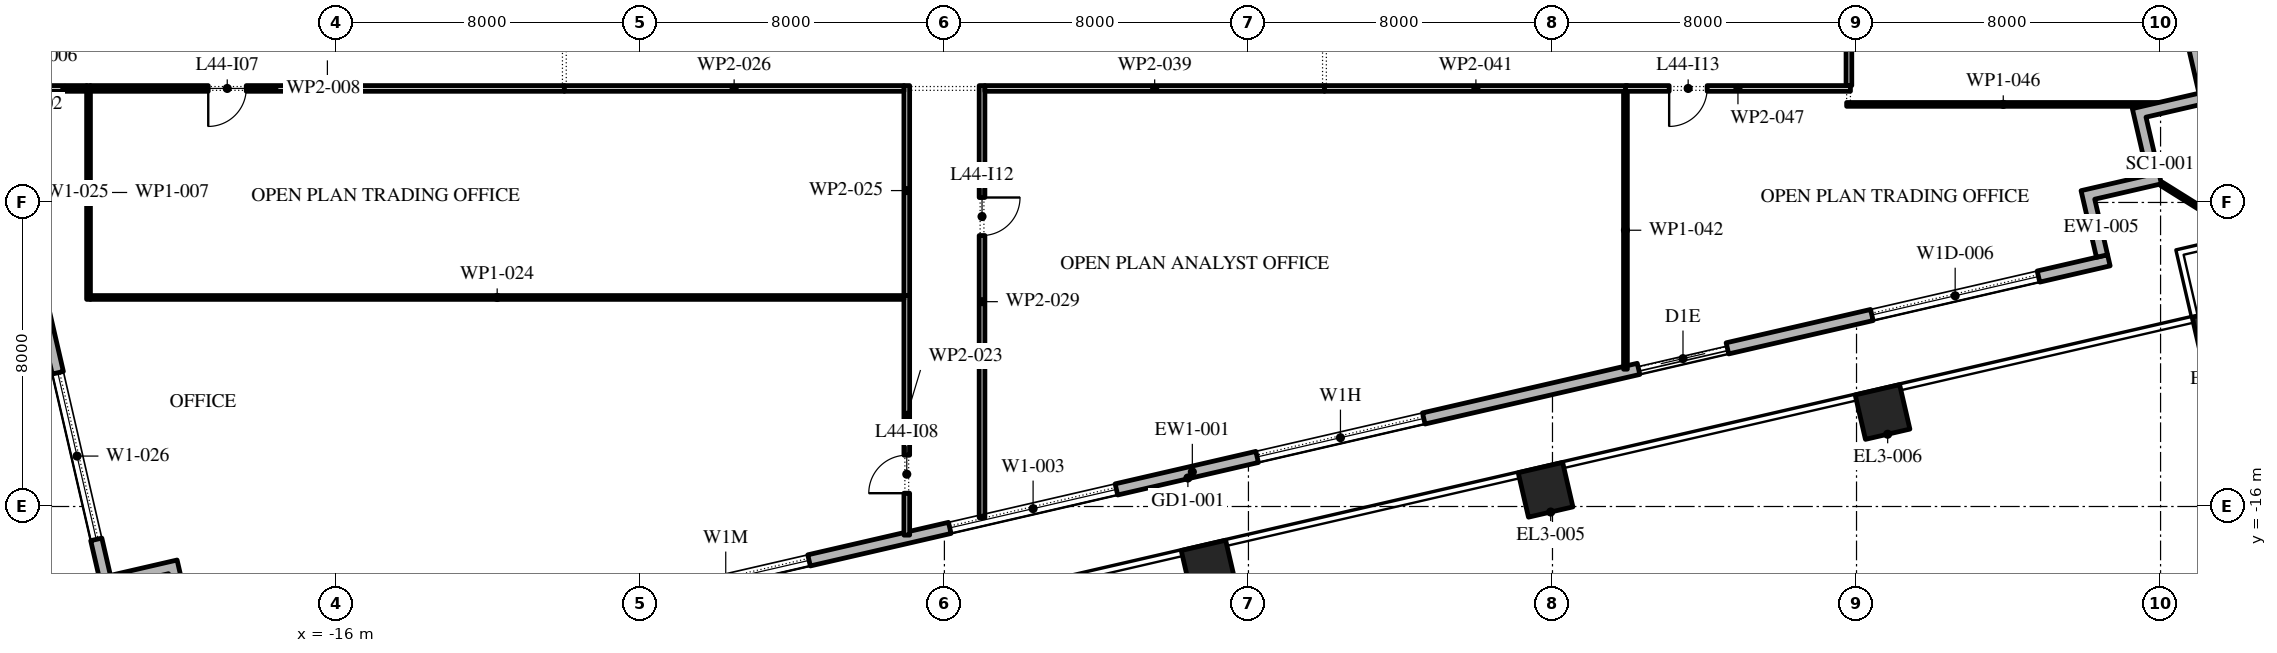
"""IFC4 building model, lengths in metres.
Left out: names, types, materials, properties, quantities, classifications, styles, units other than length and angle.
Written with IfcOpenShell. Run it as: python <this file> out.ifc"""

import sys

from ifc_helpers import new_model, si_unit, direction, frame, frame_2d, origin, origin_2d, place, context, subcontext, project, spatial, polyline, rectangle, outline, extrude, element, fill, save


model = new_model("IFC4")
c1 = context("Model", 3, precision=1e-05, world=origin(), true_north=direction((0.0, 1.0)))
c2 = subcontext(c1, "Body", "Model", "MODEL_VIEW")
j1 = project(units=[si_unit("LENGTHUNIT", "METRE"), si_unit("PLANEANGLEUNIT", "RADIAN")], contexts=[c1])
p1 = place(None, origin())
s1 = spatial("IfcSite", under=j1, at=p1, CompositionType="ELEMENT")
p2 = place(p1, origin())
s2 = spatial("IfcBuilding", under=s1, at=p2, CompositionType="ELEMENT")
p3 = place(p2, frame((0.0, 0.0, 201.0)))
s3 = spatial("IfcBuildingStorey", under=s2, at=p3, CompositionType="ELEMENT", Elevation=201.0)
for number, where, z_axis, x_axis in (
    (1, (6.951, -17.608, 0.0), (0.0, 0.0, 1.0), (0.974, 0.225, 0.0)),
    (2, (15.818, -15.561, 0.0), (0.0, 0.0, 1.0), (0.974, 0.225, 0.0)),
    (3, (24.685, -13.514, 0.0), (0.0, 0.0, 1.0), (0.974, 0.225, 0.0)),
    (4, (33.551, -11.467, 0.0), (0.0, 0.0, 1.0), (0.974, 0.225, 0.0)),
):
    element("IfcColumn", number, at=place(p3, frame(where, z_axis=z_axis, x_axis=x_axis)), inside=s3, PredefinedType="COLUMN", context=c2, shape_type="SweptSolid", body=[
        extrude(rectangle(XDim=1.2, YDim=1.2, at=origin_2d()), origin(), (0.0, 0.0, 1.0), 4.2),
    ])
p4 = place(p3, frame((-17.592, -20.657, 0.0), z_axis=(0.0, 0.0, 1.0), x_axis=(0.974370243697, 0.224950279389, 0.0)))
e5 = element("IfcWall", 5, at=p4, inside=s3, PredefinedType="STANDARD", context=c2, shape_type="SweptSolid", body=[
    extrude(rectangle(XDim=49.5, YDim=0.3, at=frame_2d((24.75, 0.0))), origin(), (0.0, 0.0, 1.0), 4.0),
])
p5 = place(p4, frame((2.8, 0.0, 0.0)))
e6 = element("IfcOpeningElement", 6, at=p5, cuts=e5, PredefinedType="OPENING", context=c2, shape_type="SweptSolid", body=[
    extrude(rectangle(XDim=2.4, YDim=3.5, at=frame_2d((1.2, 1.75))), frame((0.0, 0.16, 0.0), z_axis=(0.0, -1.0, 0.0), x_axis=(1.0, 0.0, 0.0)), (0.0, 0.0, 1.0), 0.32),
])
p6 = place(p4, frame((9.9, 0.0, 0.45)))
e7 = element("IfcOpeningElement", 7, at=p6, cuts=e5, PredefinedType="OPENING", context=c2, shape_type="SweptSolid", body=[
    extrude(rectangle(XDim=4.5, YDim=2.575, at=frame_2d((2.25, 1.288))), frame((0.0, 0.16, 0.0), z_axis=(0.0, -1.0, 0.0), x_axis=(1.0, 0.0, 0.0)), (0.0, 0.0, 1.0), 0.32),
])
p7 = place(p4, frame((18.2, 0.0, 0.45)))
e8 = element("IfcOpeningElement", 8, at=p7, cuts=e5, PredefinedType="OPENING", context=c2, shape_type="SweptSolid", body=[
    extrude(rectangle(XDim=4.5, YDim=3.05, at=frame_2d((2.25, 1.525))), frame((0.0, 0.16, 0.0), z_axis=(0.0, -1.0, 0.0), x_axis=(1.0, 0.0, 0.0)), (0.0, 0.0, 1.0), 0.32),
])
p8 = place(p4, frame((26.5, 0.0, 0.45)))
e9 = element("IfcOpeningElement", 9, at=p8, cuts=e5, PredefinedType="OPENING", context=c2, shape_type="SweptSolid", body=[
    extrude(rectangle(XDim=4.5, YDim=2.75, at=frame_2d((2.25, 1.375))), frame((0.0, 0.16, 0.0), z_axis=(0.0, -1.0, 0.0), x_axis=(1.0, 0.0, 0.0)), (0.0, 0.0, 1.0), 0.32),
])
p9 = place(p4, frame((36.8, 0.0, 0.0)))
e10 = element("IfcOpeningElement", 10, at=p9, cuts=e5, PredefinedType="OPENING", context=c2, shape_type="SweptSolid", body=[
    extrude(rectangle(XDim=2.4, YDim=3.275, at=frame_2d((1.2, 1.637))), frame((0.0, 0.16, 0.0), z_axis=(0.0, -1.0, 0.0), x_axis=(1.0, 0.0, 0.0)), (0.0, 0.0, 1.0), 0.32),
])
p10 = place(p4, frame((43.1, 0.0, 0.45)))
e11 = element("IfcOpeningElement", 11, at=p10, cuts=e5, PredefinedType="OPENING", context=c2, shape_type="SweptSolid", body=[
    extrude(rectangle(XDim=4.5, YDim=2.875, at=frame_2d((2.25, 1.438))), frame((0.0, 0.16, 0.0), z_axis=(0.0, -1.0, 0.0), x_axis=(1.0, 0.0, 0.0)), (0.0, 0.0, 1.0), 0.32),
])
p11 = place(p3, frame((33.157, -5.092, 0.0), z_axis=(0.0, 0.0, 1.0), x_axis=(-0.224950279389, 0.974370243697, 0.0)))
e12 = element("IfcWall", 12, at=p11, inside=s3, PredefinedType="STANDARD", context=c2, shape_type="SweptSolid", body=[
    extrude(rectangle(XDim=49.5, YDim=0.3, at=frame_2d((24.75, 0.0))), origin(), (0.0, 0.0, 1.0), 4.0),
])
p12 = place(p11, frame((2.207, 0.0, 0.0)))
e13 = element("IfcOpeningElement", 13, at=p12, cuts=e12, PredefinedType="OPENING", context=c2, shape_type="SweptSolid", body=[
    extrude(rectangle(XDim=2.4, YDim=3.125, at=frame_2d((1.2, 1.562))), frame((0.0, 0.16, 0.0), z_axis=(0.0, -1.0, 0.0), x_axis=(1.0, 0.0, 0.0)), (0.0, 0.0, 1.0), 0.32),
])
p13 = place(p11, frame((8.121, 0.0, 0.45)))
e14 = element("IfcOpeningElement", 14, at=p13, cuts=e12, PredefinedType="OPENING", context=c2, shape_type="SweptSolid", body=[
    extrude(rectangle(XDim=4.5, YDim=2.875, at=frame_2d((2.25, 1.438))), frame((0.0, 0.16, 0.0), z_axis=(0.0, -1.0, 0.0), x_axis=(1.0, 0.0, 0.0)), (0.0, 0.0, 1.0), 0.32),
])
p14 = place(p11, frame((15.236, 0.0, 0.45)))
e15 = element("IfcOpeningElement", 15, at=p14, cuts=e12, PredefinedType="OPENING", context=c2, shape_type="SweptSolid", body=[
    extrude(rectangle(XDim=4.5, YDim=2.875, at=frame_2d((2.25, 1.438))), frame((0.0, 0.16, 0.0), z_axis=(0.0, -1.0, 0.0), x_axis=(1.0, 0.0, 0.0)), (0.0, 0.0, 1.0), 0.32),
])
p15 = place(p11, frame((22.35, 0.0, 0.45)))
e16 = element("IfcOpeningElement", 16, at=p15, cuts=e12, PredefinedType="OPENING", context=c2, shape_type="SweptSolid", body=[
    extrude(rectangle(XDim=4.5, YDim=3.0, at=frame_2d((2.25, 1.5))), frame((0.0, 0.16, 0.0), z_axis=(0.0, -1.0, 0.0), x_axis=(1.0, 0.0, 0.0)), (0.0, 0.0, 1.0), 0.32),
])
p16 = place(p11, frame((30.514, 0.0, 0.0)))
e17 = element("IfcOpeningElement", 17, at=p16, cuts=e12, PredefinedType="OPENING", context=c2, shape_type="SweptSolid", body=[
    extrude(rectangle(XDim=2.4, YDim=3.45, at=frame_2d((1.2, 1.725))), frame((0.0, 0.16, 0.0), z_axis=(0.0, -1.0, 0.0), x_axis=(1.0, 0.0, 0.0)), (0.0, 0.0, 1.0), 0.32),
])
p17 = place(p11, frame((36.579, 0.0, 0.45)))
e18 = element("IfcOpeningElement", 18, at=p17, cuts=e12, PredefinedType="OPENING", context=c2, shape_type="SweptSolid", body=[
    extrude(rectangle(XDim=4.5, YDim=3.05, at=frame_2d((2.25, 1.525))), frame((0.0, 0.16, 0.0), z_axis=(0.0, -1.0, 0.0), x_axis=(1.0, 0.0, 0.0)), (0.0, 0.0, 1.0), 0.32),
])
p18 = place(p11, frame((43.693, 0.0, 0.45)))
e19 = element("IfcOpeningElement", 19, at=p18, cuts=e12, PredefinedType="OPENING", context=c2, shape_type="SweptSolid", body=[
    extrude(rectangle(XDim=4.5, YDim=3.05, at=frame_2d((2.25, 1.525))), frame((0.0, 0.16, 0.0), z_axis=(0.0, -1.0, 0.0), x_axis=(1.0, 0.0, 0.0)), (0.0, 0.0, 1.0), 0.32),
])
p19 = place(p3, frame((-33.157, 30.092, 0.0), z_axis=(0.0, 0.0, 1.0), x_axis=(0.224950279389, -0.974370243697, 0.0)))
e20 = element("IfcWall", 20, at=p19, inside=s3, PredefinedType="STANDARD", context=c2, shape_type="SweptSolid", body=[
    extrude(rectangle(XDim=49.5, YDim=0.3, at=frame_2d((24.75, 0.0))), origin(), (0.0, 0.0, 1.0), 4.0),
])
p20 = place(p19, frame((2.207, 0.0, 0.0)))
e21 = element("IfcOpeningElement", 21, at=p20, cuts=e20, PredefinedType="OPENING", context=c2, shape_type="SweptSolid", body=[
    extrude(rectangle(XDim=2.4, YDim=3.5, at=frame_2d((1.2, 1.75))), frame((0.0, 0.16, 0.0), z_axis=(0.0, -1.0, 0.0), x_axis=(1.0, 0.0, 0.0)), (0.0, 0.0, 1.0), 0.32),
])
p21 = place(p19, frame((8.121, 0.0, 0.45)))
e22 = element("IfcOpeningElement", 22, at=p21, cuts=e20, PredefinedType="OPENING", context=c2, shape_type="SweptSolid", body=[
    extrude(rectangle(XDim=4.5, YDim=2.825, at=frame_2d((2.25, 1.413))), frame((0.0, 0.16, 0.0), z_axis=(0.0, -1.0, 0.0), x_axis=(1.0, 0.0, 0.0)), (0.0, 0.0, 1.0), 0.32),
])
p22 = place(p19, frame((15.236, 0.0, 0.45)))
e23 = element("IfcOpeningElement", 23, at=p22, cuts=e20, PredefinedType="OPENING", context=c2, shape_type="SweptSolid", body=[
    extrude(rectangle(XDim=4.5, YDim=2.95, at=frame_2d((2.25, 1.475))), frame((0.0, 0.16, 0.0), z_axis=(0.0, -1.0, 0.0), x_axis=(1.0, 0.0, 0.0)), (0.0, 0.0, 1.0), 0.32),
])
p23 = place(p19, frame((22.35, 0.0, 0.45)))
e24 = element("IfcOpeningElement", 24, at=p23, cuts=e20, PredefinedType="OPENING", context=c2, shape_type="SweptSolid", body=[
    extrude(rectangle(XDim=4.5, YDim=3.0, at=frame_2d((2.25, 1.5))), frame((0.0, 0.16, 0.0), z_axis=(0.0, -1.0, 0.0), x_axis=(1.0, 0.0, 0.0)), (0.0, 0.0, 1.0), 0.32),
])
p24 = place(p19, frame((30.514, 0.0, 0.0)))
e25 = element("IfcOpeningElement", 25, at=p24, cuts=e20, PredefinedType="OPENING", context=c2, shape_type="SweptSolid", body=[
    extrude(rectangle(XDim=2.4, YDim=3.5, at=frame_2d((1.2, 1.75))), frame((0.0, 0.16, 0.0), z_axis=(0.0, -1.0, 0.0), x_axis=(1.0, 0.0, 0.0)), (0.0, 0.0, 1.0), 0.32),
])
p25 = place(p19, frame((36.579, 0.0, 0.45)))
e26 = element("IfcOpeningElement", 26, at=p25, cuts=e20, PredefinedType="OPENING", context=c2, shape_type="SweptSolid", body=[
    extrude(rectangle(XDim=4.5, YDim=3.05, at=frame_2d((2.25, 1.525))), frame((0.0, 0.16, 0.0), z_axis=(0.0, -1.0, 0.0), x_axis=(1.0, 0.0, 0.0)), (0.0, 0.0, 1.0), 0.32),
])
p26 = place(p19, frame((43.693, 0.0, 0.45)))
e27 = element("IfcOpeningElement", 27, at=p26, cuts=e20, PredefinedType="OPENING", context=c2, shape_type="SweptSolid", body=[
    extrude(rectangle(XDim=4.5, YDim=3.05, at=frame_2d((2.25, 1.525))), frame((0.0, 0.16, 0.0), z_axis=(0.0, -1.0, 0.0), x_axis=(1.0, 0.0, 0.0)), (0.0, 0.0, 1.0), 0.32),
])
p27 = place(p3, origin())
e28 = element("IfcWall", 28, at=p27, inside=s3, PredefinedType="STANDARD", context=c2, shape_type="SweptSolid", body=[
    extrude(outline(polyline([(31.662, -7.285), (31.257, -5.531), (33.303, -5.058), (33.371, -5.351), (31.617, -5.756), (32.022, -7.51), (30.268, -7.914), (30.605, -9.376), (30.313, -9.443), (29.908, -7.69), (31.662, -7.285)])), origin(), (0.0, 0.0, 1.0), 4.0),
])
p28 = place(p3, origin())
e29 = element("IfcWall", 29, at=p28, inside=s3, PredefinedType="STANDARD", context=c2, shape_type="SweptSolid", body=[
    extrude(outline(polyline([(-18.256, -19.117), (-20.01, -19.522), (-20.414, -17.768), (-21.876, -18.105), (-21.943, -17.813), (-20.19, -17.408), (-19.785, -19.162), (-18.031, -18.757), (-17.558, -20.803), (-17.851, -20.871), (-18.256, -19.117)])), origin(), (0.0, 0.0, 1.0), 4.0),
])
p29 = place(p3, frame((32.022, -7.51, -0.05), z_axis=(0.0, 0.0, 1.0), x_axis=(0.848047176257, -0.529920736377, 0.0)))
e30 = element("IfcWall", 30, at=p29, inside=s3, PredefinedType="STANDARD", context=c2, shape_type="SweptSolid", body=[
    extrude(rectangle(XDim=2.526, YDim=0.1, at=frame_2d((1.263, 0.0))), origin(), (0.0, 0.0, 1.0), 4.05),
])
p30 = place(p3, frame((-22.52, -10.55, 0.0), z_axis=(0.0, 0.0, 1.0), x_axis=(0.0, 1.0, 0.0)))
e31 = element("IfcWall", 31, at=p30, inside=s3, PredefinedType="PARTITIONING", context=c2, shape_type="SweptSolid", body=[
    extrude(rectangle(XDim=5.625, YDim=0.1, at=frame_2d((2.812, 0.0))), origin(), (0.0, 0.0, 1.0), 4.0),
])
p31 = place(p3, frame((-22.57, -5.0, 0.0), z_axis=(0.0, 0.0, 1.0), x_axis=(-1.0, 0.0, 0.0)))
e32 = element("IfcWall", 32, at=p31, inside=s3, PredefinedType="PARTITIONING", context=c2, shape_type="SweptSolid", body=[
    extrude(rectangle(XDim=1.145, YDim=0.15, at=frame_2d((0.573, 0.0))), origin(), (0.0, 0.0, 1.0), 4.0),
])
p32 = place(p3, frame((-10.0, -5.0, 0.0), z_axis=(0.0, 0.0, 1.0), x_axis=(-1.0, 0.0, 0.0)))
e33 = element("IfcWall", 33, at=p32, inside=s3, PredefinedType="PARTITIONING", context=c2, shape_type="SweptSolid", body=[
    extrude(rectangle(XDim=12.47, YDim=0.15, at=frame_2d((6.235, 0.0))), origin(), (0.0, 0.0, 1.0), 4.0),
])
p33 = place(p32, frame((8.37, 0.0, 0.0)))
e34 = element("IfcOpeningElement", 34, at=p33, cuts=e33, PredefinedType="OPENING", context=c2, shape_type="SweptSolid", body=[
    extrude(rectangle(XDim=1.0, YDim=2.1, at=frame_2d((0.5, 1.05))), frame((0.0, 0.085, 0.0), z_axis=(0.0, -1.0, 0.0), x_axis=(1.0, 0.0, 0.0)), (0.0, 0.0, 1.0), 0.17),
])
p34 = place(p3, frame((-0.99, -16.753, 0.0), z_axis=(0.0, 0.0, 1.0), x_axis=(0.0, 1.0, 0.0)))
e35 = element("IfcWall", 35, at=p34, inside=s3, PredefinedType="PARTITIONING", context=c2, shape_type="SweptSolid", body=[
    extrude(rectangle(XDim=6.303, YDim=0.15, at=frame_2d((3.151, 0.0))), origin(), (0.0, 0.0, 1.0), 4.0),
])
p35 = place(p34, frame((1.103, 0.0, 0.0)))
e36 = element("IfcOpeningElement", 36, at=p35, cuts=e35, PredefinedType="OPENING", context=c2, shape_type="SweptSolid", body=[
    extrude(rectangle(XDim=1.0, YDim=2.1, at=frame_2d((0.5, 1.05))), frame((0.0, 0.085, 0.0), z_axis=(0.0, -1.0, 0.0), x_axis=(1.0, 0.0, 0.0)), (0.0, 0.0, 1.0), 0.17),
])
p36 = place(p3, frame((-1.065, -10.5, 0.0), z_axis=(0.0, 0.0, 1.0), x_axis=(-1.0, 0.0, 0.0)))
e37 = element("IfcWall", 37, at=p36, inside=s3, PredefinedType="PARTITIONING", context=c2, shape_type="SweptSolid", body=[
    extrude(rectangle(XDim=21.405, YDim=0.1, at=frame_2d((10.703, 0.0))), origin(), (0.0, 0.0, 1.0), 4.0),
])
p37 = place(p3, frame((-0.99, -10.45, 0.0), z_axis=(0.0, 0.0, 1.0), x_axis=(0.0, 1.0, 0.0)))
e38 = element("IfcWall", 38, at=p37, inside=s3, PredefinedType="PARTITIONING", context=c2, shape_type="SweptSolid", body=[
    extrude(rectangle(XDim=5.525, YDim=0.15, at=frame_2d((2.762, 0.0))), origin(), (0.0, 0.0, 1.0), 4.0),
])
p38 = place(p3, frame((-1.065, -5.0, 0.0), z_axis=(0.0, 0.0, 1.0), x_axis=(-1.0, 0.0, 0.0)))
e39 = element("IfcWall", 39, at=p38, inside=s3, PredefinedType="PARTITIONING", context=c2, shape_type="SweptSolid", body=[
    extrude(rectangle(XDim=8.935, YDim=0.15, at=frame_2d((4.468, 0.0))), origin(), (0.0, 0.0, 1.0), 4.0),
])
p39 = place(p3, frame((0.99, -4.925, 0.0), z_axis=(0.0, 0.0, 1.0), x_axis=(0.0, -1.0, 0.0)))
e40 = element("IfcWall", 40, at=p39, inside=s3, PredefinedType="PARTITIONING", context=c2, shape_type="SweptSolid", body=[
    extrude(rectangle(XDim=11.371, YDim=0.15, at=frame_2d((5.686, 0.0))), origin(), (0.0, 0.0, 1.0), 4.0),
])
p40 = place(p39, frame((2.945, 0.0, 0.0)))
e41 = element("IfcOpeningElement", 41, at=p40, cuts=e40, PredefinedType="OPENING", context=c2, shape_type="SweptSolid", body=[
    extrude(rectangle(XDim=1.0, YDim=2.1, at=frame_2d((0.5, 1.05))), frame((0.0, 0.085, 0.0), z_axis=(0.0, -1.0, 0.0), x_axis=(1.0, 0.0, 0.0)), (0.0, 0.0, 1.0), 0.17),
])
p41 = place(p3, frame((10.0, -5.0, 0.0), z_axis=(0.0, 0.0, 1.0), x_axis=(-1.0, 0.0, 0.0)))
e42 = element("IfcWall", 42, at=p41, inside=s3, PredefinedType="PARTITIONING", context=c2, shape_type="SweptSolid", body=[
    extrude(rectangle(XDim=8.935, YDim=0.15, at=frame_2d((4.468, 0.0))), origin(), (0.0, 0.0, 1.0), 4.0),
])
p42 = place(p3, frame((17.97, -5.0, 0.0), z_axis=(0.0, 0.0, 1.0), x_axis=(-1.0, 0.0, 0.0)))
e43 = element("IfcWall", 43, at=p42, inside=s3, PredefinedType="PARTITIONING", context=c2, shape_type="SweptSolid", body=[
    extrude(rectangle(XDim=7.97, YDim=0.15, at=frame_2d((3.985, 0.0))), origin(), (0.0, 0.0, 1.0), 4.0),
])
p43 = place(p3, frame((17.92, -5.075, 0.0), z_axis=(0.0, 0.0, 1.0), x_axis=(0.0, -1.0, 0.0)))
e44 = element("IfcWall", 44, at=p43, inside=s3, PredefinedType="PARTITIONING", context=c2, shape_type="SweptSolid", body=[
    extrude(rectangle(XDim=7.312, YDim=0.1, at=frame_2d((3.656, 0.0))), origin(), (0.0, 0.0, 1.0), 4.0),
])
p44 = place(p3, frame((23.74, -5.42, 0.0), z_axis=(0.0, 0.0, 1.0), x_axis=(1.0, 0.0, 0.0)))
e45 = element("IfcWall", 45, at=p44, inside=s3, PredefinedType="PARTITIONING", context=c2, shape_type="SweptSolid", body=[
    extrude(rectangle(XDim=8.242, YDim=0.1, at=frame_2d((4.121, 0.0))), origin(), (0.0, 0.0, 1.0), 4.0),
])
p45 = place(p3, frame((23.84, -5.0, 0.0), z_axis=(0.0, 0.0, 1.0), x_axis=(-1.0, 0.0, 0.0)))
e46 = element("IfcWall", 46, at=p45, inside=s3, PredefinedType="PARTITIONING", context=c2, shape_type="SweptSolid", body=[
    extrude(rectangle(XDim=5.92, YDim=0.15, at=frame_2d((2.96, 0.0))), origin(), (0.0, 0.0, 1.0), 4.0),
])
p46 = place(p45, frame((3.77, 0.0, 0.0)))
e47 = element("IfcOpeningElement", 47, at=p46, cuts=e46, PredefinedType="OPENING", context=c2, shape_type="SweptSolid", body=[
    extrude(rectangle(XDim=1.0, YDim=2.1, at=frame_2d((0.5, 1.05))), frame((0.0, 0.085, 0.0), z_axis=(0.0, -1.0, 0.0), x_axis=(1.0, 0.0, 0.0)), (0.0, 0.0, 1.0), 0.17),
])
p47 = place(p3, frame((23.8, 2.74, 0.0), z_axis=(0.0, 0.0, 1.0), x_axis=(0.0, -1.0, 0.0)))
e48 = element("IfcWall", 48, at=p47, inside=s3, PredefinedType="PARTITIONING", context=c2, shape_type="SweptSolid", body=[
    extrude(rectangle(XDim=7.665, YDim=0.15, at=frame_2d((3.833, 0.0))), origin(), (0.0, 0.0, 1.0), 4.0),
])
p48 = place(p47, frame((4.09, 0.0, 0.0)))
e49 = element("IfcOpeningElement", 49, at=p48, cuts=e48, PredefinedType="OPENING", context=c2, shape_type="SweptSolid", body=[
    extrude(rectangle(XDim=1.0, YDim=2.1, at=frame_2d((0.5, 1.05))), frame((0.0, 0.085, 0.0), z_axis=(0.0, -1.0, 0.0), x_axis=(1.0, 0.0, 0.0)), (0.0, 0.0, 1.0), 0.17),
])
p49 = place(p6, origin())
e50 = element("IfcWindow", 50, at=p49, inside=s3, PartitioningType="DOUBLE_PANEL_VERTICAL", PredefinedType="WINDOW", context=c2, shape_type="SweptSolid", body=[
    extrude(rectangle(XDim=4.5, YDim=2.575, at=frame_2d((2.25, 1.288))), frame((0.0, 0.03, 0.0), z_axis=(0.0, -1.0, 0.0), x_axis=(1.0, 0.0, 0.0)), (0.0, 0.0, 1.0), 0.06),
])
fill(e7, e50)
p50 = place(p7, origin())
e51 = element("IfcWindow", 51, at=p50, inside=s3, PartitioningType="DOUBLE_PANEL_VERTICAL", PredefinedType="WINDOW", context=c2, shape_type="SweptSolid", body=[
    extrude(rectangle(XDim=4.5, YDim=3.05, at=frame_2d((2.25, 1.525))), frame((0.0, 0.03, 0.0), z_axis=(0.0, -1.0, 0.0), x_axis=(1.0, 0.0, 0.0)), (0.0, 0.0, 1.0), 0.06),
])
fill(e8, e51)
p51 = place(p8, origin())
e52 = element("IfcWindow", 52, at=p51, inside=s3, PartitioningType="DOUBLE_PANEL_VERTICAL", PredefinedType="WINDOW", context=c2, shape_type="SweptSolid", body=[
    extrude(rectangle(XDim=4.5, YDim=2.75, at=frame_2d((2.25, 1.375))), frame((0.0, 0.03, 0.0), z_axis=(0.0, -1.0, 0.0), x_axis=(1.0, 0.0, 0.0)), (0.0, 0.0, 1.0), 0.06),
])
fill(e9, e52)
p52 = place(p9, origin())
e53 = element("IfcDoor", 53, at=p52, inside=s3, OperationType="DOUBLE_DOOR_SLIDING", PredefinedType="DOOR", context=c2, shape_type="SweptSolid", body=[
    extrude(rectangle(XDim=2.4, YDim=3.275, at=frame_2d((1.2, 1.637))), frame((0.0, 0.025, 0.0), z_axis=(0.0, -1.0, 0.0), x_axis=(1.0, 0.0, 0.0)), (0.0, 0.0, 1.0), 0.05),
])
fill(e10, e53)
p53 = place(p10, origin())
e54 = element("IfcWindow", 54, at=p53, inside=s3, PartitioningType="DOUBLE_PANEL_VERTICAL", PredefinedType="WINDOW", context=c2, shape_type="SweptSolid", body=[
    extrude(rectangle(XDim=4.5, YDim=2.875, at=frame_2d((2.25, 1.438))), frame((0.0, 0.03, 0.0), z_axis=(0.0, -1.0, 0.0), x_axis=(1.0, 0.0, 0.0)), (0.0, 0.0, 1.0), 0.06),
])
fill(e11, e54)
p54 = place(p26, origin())
e55 = element("IfcWindow", 55, at=p54, inside=s3, PartitioningType="DOUBLE_PANEL_VERTICAL", PredefinedType="WINDOW", context=c2, shape_type="SweptSolid", body=[
    extrude(rectangle(XDim=4.5, YDim=3.05, at=frame_2d((2.25, 1.525))), frame((0.0, 0.03, 0.0), z_axis=(0.0, -1.0, 0.0), x_axis=(1.0, 0.0, 0.0)), (0.0, 0.0, 1.0), 0.06),
])
fill(e27, e55)
p55 = place(p33, origin())
e56 = element("IfcDoor", 56, at=p55, inside=s3, OperationType="SINGLE_SWING_LEFT", PredefinedType="DOOR", context=c2, shape_type="SweptSolid", body=[
    extrude(rectangle(XDim=1.0, YDim=2.1, at=frame_2d((0.5, 1.05))), frame((0.0, 0.025, 0.0), z_axis=(0.0, -1.0, 0.0), x_axis=(1.0, 0.0, 0.0)), (0.0, 0.0, 1.0), 0.05),
])
fill(e34, e56)
p56 = place(p35, origin())
e57 = element("IfcDoor", 57, at=p56, inside=s3, OperationType="SINGLE_SWING_RIGHT", PredefinedType="DOOR", context=c2, shape_type="SweptSolid", body=[
    extrude(rectangle(XDim=1.0, YDim=2.1, at=frame_2d((0.5, 1.05))), frame((0.0, 0.025, 0.0), z_axis=(0.0, -1.0, 0.0), x_axis=(1.0, 0.0, 0.0)), (0.0, 0.0, 1.0), 0.05),
])
fill(e36, e57)
p57 = place(p40, origin())
e58 = element("IfcDoor", 58, at=p57, inside=s3, OperationType="SINGLE_SWING_RIGHT", PredefinedType="DOOR", context=c2, shape_type="SweptSolid", body=[
    extrude(rectangle(XDim=1.0, YDim=2.1, at=frame_2d((0.5, 1.05))), frame((0.0, 0.025, 0.0), z_axis=(0.0, -1.0, 0.0), x_axis=(1.0, 0.0, 0.0)), (0.0, 0.0, 1.0), 0.05),
])
fill(e41, e58)
p58 = place(p46, origin())
e59 = element("IfcDoor", 59, at=p58, inside=s3, OperationType="SINGLE_SWING_LEFT", PredefinedType="DOOR", context=c2, shape_type="SweptSolid", body=[
    extrude(rectangle(XDim=1.0, YDim=2.1, at=frame_2d((0.5, 1.05))), frame((0.0, 0.025, 0.0), z_axis=(0.0, -1.0, 0.0), x_axis=(1.0, 0.0, 0.0)), (0.0, 0.0, 1.0), 0.05),
])
fill(e47, e59)
save(model, sys.argv[1])
